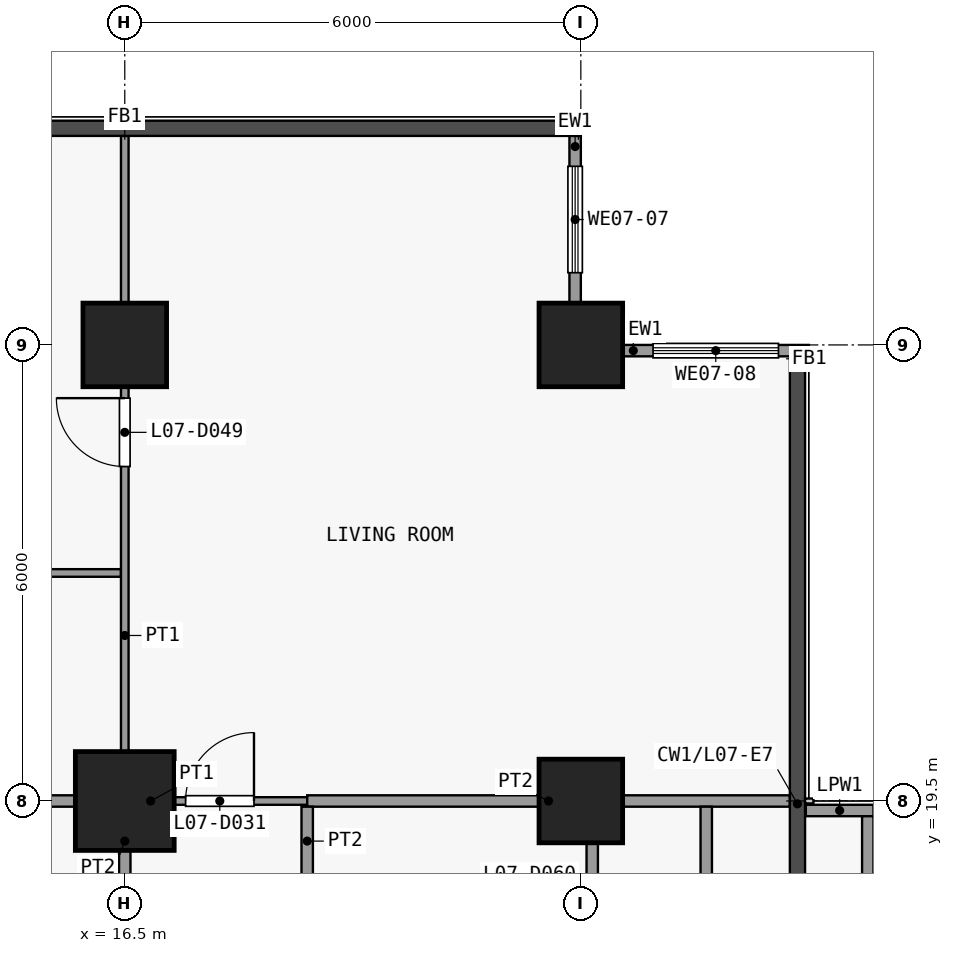
"""IFC4 building model, lengths in metres.
Left out: names, types, materials, properties, quantities, classifications, styles, units other than length and angle.
Written with IfcOpenShell. Run it as: python <this file> out.ifc"""

import sys

from ifc_helpers import new_model, si_unit, direction, frame, frame_2d, origin, origin_2d, place, context, subcontext, project, spatial, rectangle, extrude, element, fill, save


model = new_model("IFC4")
c1 = context("Model", 3, precision=1e-05, world=origin(), true_north=direction((0.0, 1.0)))
c2 = subcontext(c1, "Body", "Model", "MODEL_VIEW")
j1 = project(units=[si_unit("LENGTHUNIT", "METRE"), si_unit("PLANEANGLEUNIT", "RADIAN")], contexts=[c1])
p1 = place(None, origin())
s1 = spatial("IfcSite", under=j1, at=p1, CompositionType="ELEMENT")
p2 = place(p1, origin())
s2 = spatial("IfcBuilding", under=s1, at=p2, CompositionType="ELEMENT")
p3 = place(p2, frame((0.0, 0.0, 36.1)))
s3 = spatial("IfcBuildingStorey", under=s2, at=p3, CompositionType="ELEMENT", Elevation=36.1)
p4 = place(p3, frame((16.5, 19.5, 0.0), z_axis=(0.0, 0.0, 1.0), x_axis=(1.0, 0.0, 0.0)))
e1 = element("IfcColumn", 1, at=p4, inside=s3, PredefinedType="COLUMN", context=c2, shape_type="SweptSolid", body=[
    extrude(rectangle(XDim=1.3, YDim=1.3, at=origin_2d()), origin(), (0.0, 0.0, 1.0), 3.6),
])
for number, where, z_axis, x_axis in (
    (2, (16.5, 25.5, 0.0), (0.0, 0.0, 1.0), (1.0, 0.0, 0.0)),
    (3, (22.5, 19.5, 0.0), (0.0, 0.0, 1.0), (1.0, 0.0, 0.0)),
    (4, (22.5, 25.5, 0.0), (0.0, 0.0, 1.0), (1.0, 0.0, 0.0)),
):
    element("IfcColumn", number, at=place(p3, frame(where, z_axis=z_axis, x_axis=x_axis)), inside=s3, PredefinedType="COLUMN", context=c2, shape_type="SweptSolid", body=[
        extrude(rectangle(XDim=1.1, YDim=1.1, at=origin_2d()), origin(), (0.0, 0.0, 1.0), 3.6),
    ])
p5 = place(p3, frame((22.425, 28.25, 0.0), z_axis=(0.0, 0.0, 1.0), x_axis=(0.0, -1.0, 0.0)))
e5 = element("IfcWall", 5, at=p5, inside=s3, PredefinedType="SOLIDWALL", context=c2, shape_type="SweptSolid", body=[
    extrude(rectangle(XDim=2.2, YDim=0.15, at=frame_2d((1.1, 0.0))), origin(), (0.0, 0.0, 1.0), 3.3),
])
p6 = place(p5, frame((0.4, 0.0, 0.9)))
e6 = element("IfcOpeningElement", 6, at=p6, cuts=e5, PredefinedType="OPENING", context=c2, shape_type="SweptSolid", body=[
    extrude(rectangle(XDim=1.4, YDim=2.4, at=frame_2d((0.7, 1.2))), frame((0.0, 0.085, 0.0), z_axis=(0.0, -1.0, 0.0), x_axis=(1.0, 0.0, 0.0)), (0.0, 0.0, 1.0), 0.17),
])
p7 = place(p3, frame((23.05, 25.425, 0.0), z_axis=(0.0, 0.0, 1.0), x_axis=(1.0, 0.0, 0.0)))
e7 = element("IfcWall", 7, at=p7, inside=s3, PredefinedType="SOLIDWALL", context=c2, shape_type="SweptSolid", body=[
    extrude(rectangle(XDim=2.45, YDim=0.15, at=frame_2d((1.225, 0.0))), origin(), (0.0, 0.0, 1.0), 3.3),
])
p8 = place(p7, frame((0.4, 0.0, 0.9)))
e8 = element("IfcOpeningElement", 8, at=p8, cuts=e7, PredefinedType="OPENING", context=c2, shape_type="SweptSolid", body=[
    extrude(rectangle(XDim=1.65, YDim=2.4, at=frame_2d((0.825, 1.2))), frame((0.0, 0.085, 0.0), z_axis=(0.0, -1.0, 0.0), x_axis=(1.0, 0.0, 0.0)), (0.0, 0.0, 1.0), 0.17),
])
p9 = place(p3, frame((25.46, 19.375, 0.0), z_axis=(0.0, 0.0, 1.0), x_axis=(1.0, 0.0, 0.0)))
e9 = element("IfcWall", 9, at=p9, inside=s3, PredefinedType="PARAPET", context=c2, shape_type="SweptSolid", body=[
    extrude(rectangle(XDim=0.89, YDim=0.15, at=frame_2d((0.445, 0.0))), origin(), (0.0, 0.0, 1.0), 1.15),
])
p10 = place(p3, frame((26.275, 19.3, 0.0), z_axis=(0.0, 0.0, 1.0), x_axis=(0.0, -1.0, 0.0)))
e10 = element("IfcWall", 10, at=p10, inside=s3, PredefinedType="PARAPET", context=c2, shape_type="SweptSolid", body=[
    extrude(rectangle(XDim=5.75, YDim=0.15, at=frame_2d((2.875, 0.0))), origin(), (0.0, 0.0, 1.0), 1.15),
])
p11 = place(p3, frame((16.5, 19.5, 0.0), z_axis=(0.0, 0.0, 1.0), x_axis=(1.0, 0.0, 0.0)))
e11 = element("IfcWall", 11, at=p11, inside=s3, PredefinedType="PARTITIONING", context=c2, shape_type="SweptSolid", body=[
    extrude(rectangle(XDim=2.4, YDim=0.1, at=frame_2d((1.2, 0.0))), origin(), (0.0, 0.0, 1.0), 3.3),
])
p12 = place(p11, frame((0.8, 0.0, 0.0)))
e12 = element("IfcOpeningElement", 12, at=p12, cuts=e11, PredefinedType="OPENING", context=c2, shape_type="SweptSolid", body=[
    extrude(rectangle(XDim=0.9, YDim=2.1, at=frame_2d((0.45, 1.05))), frame((0.0, 0.06, 0.0), z_axis=(0.0, -1.0, 0.0), x_axis=(1.0, 0.0, 0.0)), (0.0, 0.0, 1.0), 0.12),
])
p13 = place(p3, frame((11.925, 19.5, 0.0), z_axis=(0.0, 0.0, 1.0), x_axis=(1.0, 0.0, 0.0)))
e13 = element("IfcWall", 13, at=p13, inside=s3, PredefinedType="PARTITIONING", context=c2, shape_type="SweptSolid", body=[
    extrude(rectangle(XDim=4.575, YDim=0.15, at=frame_2d((2.288, 0.0))), origin(), (0.0, 0.0, 1.0), 3.3),
])
p14 = place(p3, frame((18.9, 19.5, 0.0), z_axis=(0.0, 0.0, 1.0), x_axis=(1.0, 0.0, 0.0)))
e14 = element("IfcWall", 14, at=p14, inside=s3, PredefinedType="PARTITIONING", context=c2, shape_type="SweptSolid", body=[
    extrude(rectangle(XDim=6.35, YDim=0.15, at=frame_2d((3.175, 0.0))), origin(), (0.0, 0.0, 1.0), 3.3),
])
p15 = place(p3, frame((10.6, 22.5, 0.0), z_axis=(0.0, 0.0, 1.0), x_axis=(1.0, 0.0, 0.0)))
e15 = element("IfcWall", 15, at=p15, inside=s3, PredefinedType="PARTITIONING", context=c2, shape_type="SweptSolid", body=[
    extrude(rectangle(XDim=5.85, YDim=0.1, at=frame_2d((2.925, 0.0))), origin(), (0.0, 0.0, 1.0), 3.3),
])
p16 = place(p15, frame((2.5, 0.0, 0.0)))
e16 = element("IfcOpeningElement", 16, at=p16, cuts=e15, PredefinedType="OPENING", context=c2, shape_type="SweptSolid", body=[
    extrude(rectangle(XDim=0.9, YDim=2.1, at=frame_2d((0.45, 1.05))), frame((0.0, 0.06, 0.0), z_axis=(0.0, -1.0, 0.0), x_axis=(1.0, 0.0, 0.0)), (0.0, 0.0, 1.0), 0.12),
])
p17 = place(p3, frame((16.5, 19.575, 0.0), z_axis=(0.0, 0.0, 1.0), x_axis=(0.0, 1.0, 0.0)))
e17 = element("IfcWall", 17, at=p17, inside=s3, PredefinedType="PARTITIONING", context=c2, shape_type="SweptSolid", body=[
    extrude(rectangle(XDim=8.675, YDim=0.1, at=frame_2d((4.337, 0.0))), origin(), (0.0, 0.0, 1.0), 3.3),
])
p18 = place(p17, frame((4.325, 0.0, 0.0)))
e18 = element("IfcOpeningElement", 18, at=p18, cuts=e17, PredefinedType="OPENING", context=c2, shape_type="SweptSolid", body=[
    extrude(rectangle(XDim=0.9, YDim=2.1, at=frame_2d((0.45, 1.05))), frame((0.0, 0.06, 0.0), z_axis=(0.0, -1.0, 0.0), x_axis=(1.0, 0.0, 0.0)), (0.0, 0.0, 1.0), 0.12),
])
p19 = place(p3, frame((16.5, 16.6, 0.0), z_axis=(0.0, 0.0, 1.0), x_axis=(0.0, 1.0, 0.0)))
e19 = element("IfcWall", 19, at=p19, inside=s3, PredefinedType="PARTITIONING", context=c2, shape_type="SweptSolid", body=[
    extrude(rectangle(XDim=2.825, YDim=0.15, at=frame_2d((1.413, 0.0))), origin(), (0.0, 0.0, 1.0), 3.3),
])
p20 = place(p19, frame((0.9, 0.0, 0.0)))
e20 = element("IfcOpeningElement", 20, at=p20, cuts=e19, PredefinedType="OPENING", context=c2, shape_type="SweptSolid", body=[
    extrude(rectangle(XDim=0.9, YDim=2.1, at=frame_2d((0.45, 1.05))), frame((0.0, 0.085, 0.0), z_axis=(0.0, -1.0, 0.0), x_axis=(1.0, 0.0, 0.0)), (0.0, 0.0, 1.0), 0.17),
])
p21 = place(p3, frame((18.9, 16.6, 0.0), z_axis=(0.0, 0.0, 1.0), x_axis=(0.0, 1.0, 0.0)))
e21 = element("IfcWall", 21, at=p21, inside=s3, PredefinedType="PARTITIONING", context=c2, shape_type="SweptSolid", body=[
    extrude(rectangle(XDim=2.825, YDim=0.15, at=frame_2d((1.413, 0.0))), origin(), (0.0, 0.0, 1.0), 3.3),
])
p22 = place(p21, frame((0.9, 0.0, 0.0)))
e22 = element("IfcOpeningElement", 22, at=p22, cuts=e21, PredefinedType="OPENING", context=c2, shape_type="SweptSolid", body=[
    extrude(rectangle(XDim=0.9, YDim=2.1, at=frame_2d((0.45, 1.05))), frame((0.0, 0.085, 0.0), z_axis=(0.0, -1.0, 0.0), x_axis=(1.0, 0.0, 0.0)), (0.0, 0.0, 1.0), 0.17),
])
p23 = place(p3, frame((22.65, 16.6, 0.0), z_axis=(0.0, 0.0, 1.0), x_axis=(0.0, 1.0, 0.0)))
e23 = element("IfcWall", 23, at=p23, inside=s3, PredefinedType="PARTITIONING", context=c2, shape_type="SweptSolid", body=[
    extrude(rectangle(XDim=2.825, YDim=0.15, at=frame_2d((1.413, 0.0))), origin(), (0.0, 0.0, 1.0), 3.3),
])
p24 = place(p23, frame((1.0, 0.0, 0.0)))
e24 = element("IfcOpeningElement", 24, at=p24, cuts=e23, PredefinedType="OPENING", context=c2, shape_type="SweptSolid", body=[
    extrude(rectangle(XDim=0.9, YDim=2.1, at=frame_2d((0.45, 1.05))), frame((0.0, 0.085, 0.0), z_axis=(0.0, -1.0, 0.0), x_axis=(1.0, 0.0, 0.0)), (0.0, 0.0, 1.0), 0.17),
])
p25 = place(p3, frame((24.15, 16.6, 0.0), z_axis=(0.0, 0.0, 1.0), x_axis=(0.0, 1.0, 0.0)))
e25 = element("IfcWall", 25, at=p25, inside=s3, PredefinedType="PARTITIONING", context=c2, shape_type="SweptSolid", body=[
    extrude(rectangle(XDim=2.825, YDim=0.15, at=frame_2d((1.413, 0.0))), origin(), (0.0, 0.0, 1.0), 3.3),
])
p26 = place(p25, frame((1.0, 0.0, 0.0)))
e26 = element("IfcOpeningElement", 26, at=p26, cuts=e25, PredefinedType="OPENING", context=c2, shape_type="SweptSolid", body=[
    extrude(rectangle(XDim=0.9, YDim=2.1, at=frame_2d((0.45, 1.05))), frame((0.0, 0.085, 0.0), z_axis=(0.0, -1.0, 0.0), x_axis=(1.0, 0.0, 0.0)), (0.0, 0.0, 1.0), 0.17),
])
p27 = place(p6, origin())
e27 = element("IfcWindow", 27, at=p27, inside=s3, PartitioningType="SINGLE_PANEL", PredefinedType="WINDOW", context=c2, shape_type="SweptSolid", body=[
    extrude(rectangle(XDim=1.4, YDim=2.4, at=frame_2d((0.7, 1.2))), frame((0.0, 0.03, 0.0), z_axis=(0.0, -1.0, 0.0), x_axis=(1.0, 0.0, 0.0)), (0.0, 0.0, 1.0), 0.06),
])
fill(e6, e27)
p28 = place(p8, origin())
e28 = element("IfcWindow", 28, at=p28, inside=s3, PartitioningType="SINGLE_PANEL", PredefinedType="WINDOW", context=c2, shape_type="SweptSolid", body=[
    extrude(rectangle(XDim=1.65, YDim=2.4, at=frame_2d((0.825, 1.2))), frame((0.0, 0.03, 0.0), z_axis=(0.0, -1.0, 0.0), x_axis=(1.0, 0.0, 0.0)), (0.0, 0.0, 1.0), 0.06),
])
fill(e8, e28)
p29 = place(p12, origin())
e29 = element("IfcDoor", 29, at=p29, inside=s3, OperationType="SINGLE_SWING_LEFT", PredefinedType="DOOR", context=c2, shape_type="SweptSolid", body=[
    extrude(rectangle(XDim=0.9, YDim=2.1, at=frame_2d((0.45, 1.05))), frame((0.0, 0.025, 0.0), z_axis=(0.0, -1.0, 0.0), x_axis=(1.0, 0.0, 0.0)), (0.0, 0.0, 1.0), 0.05),
])
fill(e12, e29)
p30 = place(p18, origin())
e30 = element("IfcDoor", 30, at=p30, inside=s3, OperationType="SINGLE_SWING_LEFT", PredefinedType="DOOR", context=c2, shape_type="SweptSolid", body=[
    extrude(rectangle(XDim=0.9, YDim=2.1, at=frame_2d((0.45, 1.05))), frame((0.0, 0.025, 0.0), z_axis=(0.0, -1.0, 0.0), x_axis=(1.0, 0.0, 0.0)), (0.0, 0.0, 1.0), 0.05),
])
fill(e18, e30)
save(model, sys.argv[1])
